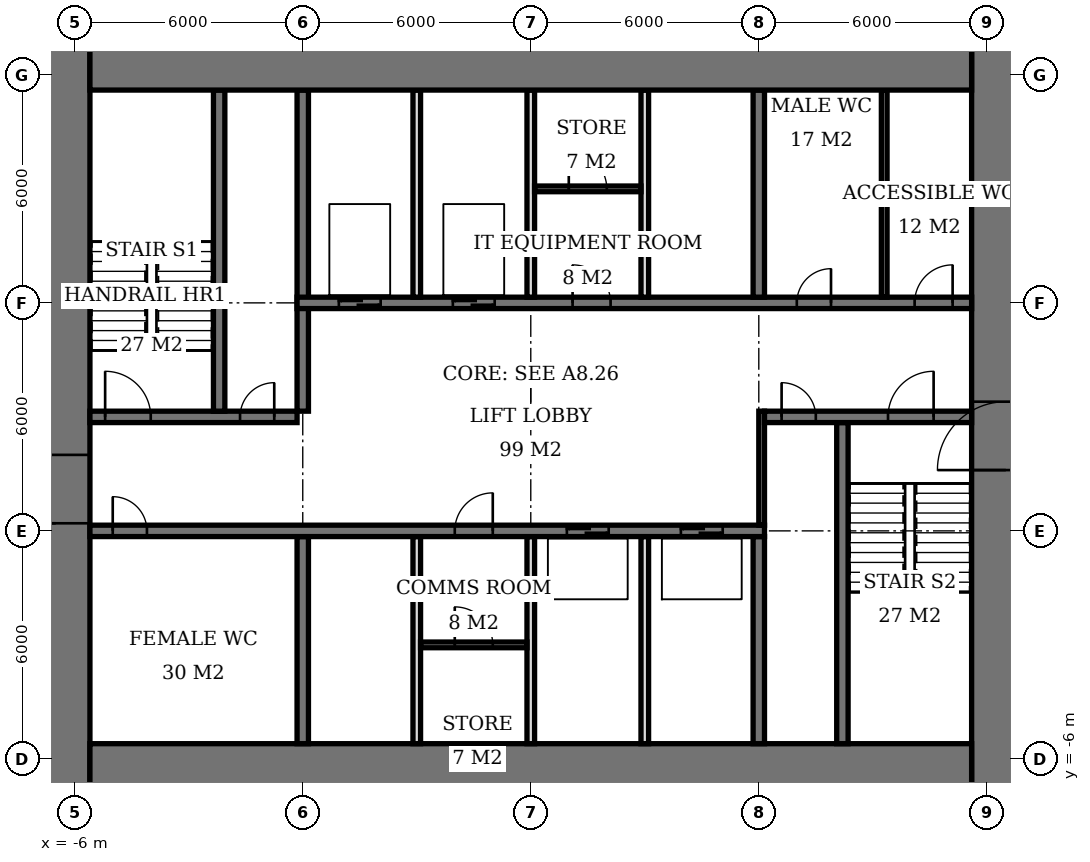
"""IFC4 building model, lengths in metres.
Left out: names, types, materials, properties, quantities, classifications, styles, units other than length and angle.
Written with IfcOpenShell. Run it as: python <this file> out.ifc"""

import sys

from ifc_helpers import new_model, si_unit, direction, frame, frame_2d, origin, place, context, subcontext, project, spatial, rectangle, extrude, element, fill, save


model = new_model("IFC4")
c1 = context("Model", 3, precision=1e-05, world=origin(), true_north=direction((0.0, 1.0)))
c2 = subcontext(c1, "Body", "Model", "MODEL_VIEW")
j1 = project(units=[si_unit("LENGTHUNIT", "METRE"), si_unit("PLANEANGLEUNIT", "RADIAN")], contexts=[c1])
p1 = place(None, origin())
s1 = spatial("IfcSite", under=j1, at=p1, CompositionType="ELEMENT")
p2 = place(p1, origin())
s2 = spatial("IfcBuilding", under=s1, at=p2, CompositionType="ELEMENT")
p3 = place(p2, frame((0.0, 0.0, 177.2)))
s3 = spatial("IfcBuildingStorey", under=s2, at=p3, CompositionType="ELEMENT", Elevation=177.2)
for number, where, z_axis, x_axis in (
    (1, (-5.6, -6.6, 0.0), (0.0, 0.0, 1.0), (1.0, 0.0, 0.0)),
    (2, (-5.6, 12.6, 0.0), (0.0, 0.0, 1.0), (1.0, 0.0, 0.0)),
):
    element("IfcWall", number, at=place(p3, frame(where, z_axis=z_axis, x_axis=x_axis)), inside=s3, PredefinedType="SHEAR", context=c2, shape_type="SweptSolid", body=[
        extrude(rectangle(XDim=23.2, YDim=2.0, at=frame_2d((11.6, 0.0))), origin(), (0.0, 0.0, 1.0), 3.9),
    ])
p4 = place(p3, frame((-6.5, -7.6, 0.0), z_axis=(0.0, 0.0, 1.0), x_axis=(0.0, 1.0, 0.0)))
e3 = element("IfcWall", 3, at=p4, inside=s3, PredefinedType="SHEAR", context=c2, shape_type="SweptSolid", body=[
    extrude(rectangle(XDim=21.2, YDim=1.8, at=frame_2d((10.6, 0.0))), origin(), (0.0, 0.0, 1.0), 3.9),
])
p5 = place(p4, frame((7.8, 0.0, 0.0)))
e4 = element("IfcOpeningElement", 4, at=p5, cuts=e3, PredefinedType="OPENING", context=c2, shape_type="SweptSolid", body=[
    extrude(rectangle(XDim=1.8, YDim=2.4, at=frame_2d((0.9, 1.2))), frame((0.0, 0.91, 0.0), z_axis=(0.0, -1.0, 0.0), x_axis=(1.0, 0.0, 0.0)), (0.0, 0.0, 1.0), 1.82),
])
p6 = place(p3, frame((18.5, -7.6, 0.0), z_axis=(0.0, 0.0, 1.0), x_axis=(0.0, 1.0, 0.0)))
e5 = element("IfcWall", 5, at=p6, inside=s3, PredefinedType="SHEAR", context=c2, shape_type="SweptSolid", body=[
    extrude(rectangle(XDim=21.2, YDim=1.8, at=frame_2d((10.6, 0.0))), origin(), (0.0, 0.0, 1.0), 3.9),
])
p7 = place(p6, frame((9.2, 0.0, 0.0)))
e6 = element("IfcOpeningElement", 6, at=p7, cuts=e5, PredefinedType="OPENING", context=c2, shape_type="SweptSolid", body=[
    extrude(rectangle(XDim=1.8, YDim=2.4, at=frame_2d((0.9, 1.2))), frame((0.0, 0.91, 0.0), z_axis=(0.0, -1.0, 0.0), x_axis=(1.0, 0.0, 0.0)), (0.0, 0.0, 1.0), 1.82),
])
p8 = place(p3, frame((-5.6, 0.0, 0.0), z_axis=(0.0, 0.0, 1.0), x_axis=(1.0, 0.0, 0.0)))
e7 = element("IfcWall", 7, at=p8, inside=s3, PredefinedType="SHEAR", context=c2, shape_type="SweptSolid", body=[
    extrude(rectangle(XDim=17.75, YDim=0.3, at=frame_2d((8.875, 0.0))), origin(), (0.0, 0.0, 1.0), 3.9),
])
p9 = place(p8, frame((0.6, 0.0, 0.0)))
e8 = element("IfcOpeningElement", 8, at=p9, cuts=e7, PredefinedType="OPENING", context=c2, shape_type="SweptSolid", body=[
    extrude(rectangle(XDim=0.9, YDim=2.1, at=frame_2d((0.45, 1.05))), frame((0.0, 0.16, 0.0), z_axis=(0.0, -1.0, 0.0), x_axis=(1.0, 0.0, 0.0)), (0.0, 0.0, 1.0), 0.32),
])
p10 = place(p8, frame((9.6, 0.0, 0.0)))
e9 = element("IfcOpeningElement", 9, at=p10, cuts=e7, PredefinedType="OPENING", context=c2, shape_type="SweptSolid", body=[
    extrude(rectangle(XDim=1.0, YDim=2.1, at=frame_2d((0.5, 1.05))), frame((0.0, 0.16, 0.0), z_axis=(0.0, -1.0, 0.0), x_axis=(1.0, 0.0, 0.0)), (0.0, 0.0, 1.0), 0.32),
])
p11 = place(p8, frame((12.55, 0.0, 0.0)))
e10 = element("IfcOpeningElement", 10, at=p11, cuts=e7, PredefinedType="OPENING", context=c2, shape_type="SweptSolid", body=[
    extrude(rectangle(XDim=1.1, YDim=2.1, at=frame_2d((0.55, 1.05))), frame((0.0, 0.16, 0.0), z_axis=(0.0, -1.0, 0.0), x_axis=(1.0, 0.0, 0.0)), (0.0, 0.0, 1.0), 0.32),
])
p12 = place(p8, frame((15.55, 0.0, 0.0)))
e11 = element("IfcOpeningElement", 11, at=p12, cuts=e7, PredefinedType="OPENING", context=c2, shape_type="SweptSolid", body=[
    extrude(rectangle(XDim=1.1, YDim=2.1, at=frame_2d((0.55, 1.05))), frame((0.0, 0.16, 0.0), z_axis=(0.0, -1.0, 0.0), x_axis=(1.0, 0.0, 0.0)), (0.0, 0.0, 1.0), 0.32),
])
p13 = place(p3, frame((-5.6, 3.0, 0.0), z_axis=(0.0, 0.0, 1.0), x_axis=(1.0, 0.0, 0.0)))
e12 = element("IfcWall", 12, at=p13, inside=s3, PredefinedType="SHEAR", context=c2, shape_type="SweptSolid", body=[
    extrude(rectangle(XDim=5.45, YDim=0.3, at=frame_2d((2.725, 0.0))), origin(), (0.0, 0.0, 1.0), 3.9),
])
p14 = place(p13, frame((0.4, 0.0, 0.0)))
e13 = element("IfcOpeningElement", 13, at=p14, cuts=e12, PredefinedType="OPENING", context=c2, shape_type="SweptSolid", body=[
    extrude(rectangle(XDim=1.2, YDim=2.1, at=frame_2d((0.6, 1.05))), frame((0.0, 0.16, 0.0), z_axis=(0.0, -1.0, 0.0), x_axis=(1.0, 0.0, 0.0)), (0.0, 0.0, 1.0), 0.32),
])
p15 = place(p13, frame((3.95, 0.0, 0.0)))
e14 = element("IfcOpeningElement", 14, at=p15, cuts=e12, PredefinedType="OPENING", context=c2, shape_type="SweptSolid", body=[
    extrude(rectangle(XDim=0.9, YDim=2.1, at=frame_2d((0.45, 1.05))), frame((0.0, 0.16, 0.0), z_axis=(0.0, -1.0, 0.0), x_axis=(1.0, 0.0, 0.0)), (0.0, 0.0, 1.0), 0.32),
])
p16 = place(p3, frame((12.15, 3.0, 0.0), z_axis=(0.0, 0.0, 1.0), x_axis=(1.0, 0.0, 0.0)))
e15 = element("IfcWall", 15, at=p16, inside=s3, PredefinedType="SHEAR", context=c2, shape_type="SweptSolid", body=[
    extrude(rectangle(XDim=5.45, YDim=0.3, at=frame_2d((2.725, 0.0))), origin(), (0.0, 0.0, 1.0), 3.9),
])
p17 = place(p16, frame((3.25, 0.0, 0.0)))
e16 = element("IfcOpeningElement", 16, at=p17, cuts=e15, PredefinedType="OPENING", context=c2, shape_type="SweptSolid", body=[
    extrude(rectangle(XDim=1.2, YDim=2.1, at=frame_2d((0.6, 1.05))), frame((0.0, 0.16, 0.0), z_axis=(0.0, -1.0, 0.0), x_axis=(1.0, 0.0, 0.0)), (0.0, 0.0, 1.0), 0.32),
])
p18 = place(p16, frame((0.45, 0.0, 0.0)))
e17 = element("IfcOpeningElement", 17, at=p18, cuts=e15, PredefinedType="OPENING", context=c2, shape_type="SweptSolid", body=[
    extrude(rectangle(XDim=0.9, YDim=2.1, at=frame_2d((0.45, 1.05))), frame((0.0, 0.16, 0.0), z_axis=(0.0, -1.0, 0.0), x_axis=(1.0, 0.0, 0.0)), (0.0, 0.0, 1.0), 0.32),
])
p19 = place(p3, frame((-0.15, 6.0, 0.0), z_axis=(0.0, 0.0, 1.0), x_axis=(1.0, 0.0, 0.0)))
e18 = element("IfcWall", 18, at=p19, inside=s3, PredefinedType="SHEAR", context=c2, shape_type="SweptSolid", body=[
    extrude(rectangle(XDim=17.75, YDim=0.3, at=frame_2d((8.875, 0.0))), origin(), (0.0, 0.0, 1.0), 3.9),
])
p20 = place(p19, frame((13.15, 0.0, 0.0)))
e19 = element("IfcOpeningElement", 19, at=p20, cuts=e18, PredefinedType="OPENING", context=c2, shape_type="SweptSolid", body=[
    extrude(rectangle(XDim=0.9, YDim=2.1, at=frame_2d((0.45, 1.05))), frame((0.0, 0.16, 0.0), z_axis=(0.0, -1.0, 0.0), x_axis=(1.0, 0.0, 0.0)), (0.0, 0.0, 1.0), 0.32),
])
p21 = place(p19, frame((16.25, 0.0, 0.0)))
e20 = element("IfcOpeningElement", 20, at=p21, cuts=e18, PredefinedType="OPENING", context=c2, shape_type="SweptSolid", body=[
    extrude(rectangle(XDim=1.0, YDim=2.1, at=frame_2d((0.5, 1.05))), frame((0.0, 0.16, 0.0), z_axis=(0.0, -1.0, 0.0), x_axis=(1.0, 0.0, 0.0)), (0.0, 0.0, 1.0), 0.32),
])
p22 = place(p19, frame((7.25, 0.0, 0.0)))
e21 = element("IfcOpeningElement", 21, at=p22, cuts=e18, PredefinedType="OPENING", context=c2, shape_type="SweptSolid", body=[
    extrude(rectangle(XDim=1.0, YDim=2.1, at=frame_2d((0.5, 1.05))), frame((0.0, 0.16, 0.0), z_axis=(0.0, -1.0, 0.0), x_axis=(1.0, 0.0, 0.0)), (0.0, 0.0, 1.0), 0.32),
])
p23 = place(p19, frame((1.1, 0.0, 0.0)))
e22 = element("IfcOpeningElement", 22, at=p23, cuts=e18, PredefinedType="OPENING", context=c2, shape_type="SweptSolid", body=[
    extrude(rectangle(XDim=1.1, YDim=2.1, at=frame_2d((0.55, 1.05))), frame((0.0, 0.16, 0.0), z_axis=(0.0, -1.0, 0.0), x_axis=(1.0, 0.0, 0.0)), (0.0, 0.0, 1.0), 0.32),
])
p24 = place(p19, frame((4.1, 0.0, 0.0)))
e23 = element("IfcOpeningElement", 23, at=p24, cuts=e18, PredefinedType="OPENING", context=c2, shape_type="SweptSolid", body=[
    extrude(rectangle(XDim=1.1, YDim=2.1, at=frame_2d((0.55, 1.05))), frame((0.0, 0.16, 0.0), z_axis=(0.0, -1.0, 0.0), x_axis=(1.0, 0.0, 0.0)), (0.0, 0.0, 1.0), 0.32),
])
p25 = place(p3, frame((0.0, -5.6, 0.0), z_axis=(0.0, 0.0, 1.0), x_axis=(0.0, 1.0, 0.0)))
e24 = element("IfcWall", 24, at=p25, inside=s3, PredefinedType="SHEAR", context=c2, shape_type="SweptSolid", body=[
    extrude(rectangle(XDim=5.45, YDim=0.3, at=frame_2d((2.725, 0.0))), origin(), (0.0, 0.0, 1.0), 3.9),
])
p26 = place(p3, frame((0.0, 3.15, 0.0), z_axis=(0.0, 0.0, 1.0), x_axis=(0.0, 1.0, 0.0)))
e25 = element("IfcWall", 25, at=p26, inside=s3, PredefinedType="SHEAR", context=c2, shape_type="SweptSolid", body=[
    extrude(rectangle(XDim=8.45, YDim=0.3, at=frame_2d((4.225, 0.0))), origin(), (0.0, 0.0, 1.0), 3.9),
])
for number, where, z_axis, x_axis in (
    (26, (12.0, -5.6, 0.0), (0.0, 0.0, 1.0), (0.0, 1.0, 0.0)),
    (27, (12.0, 6.15, 0.0), (0.0, 0.0, 1.0), (0.0, 1.0, 0.0)),
):
    element("IfcWall", number, at=place(p3, frame(where, z_axis=z_axis, x_axis=x_axis)), inside=s3, PredefinedType="SHEAR", context=c2, shape_type="SweptSolid", body=[
        extrude(rectangle(XDim=5.45, YDim=0.3, at=frame_2d((2.725, 0.0))), origin(), (0.0, 0.0, 1.0), 3.9),
    ])
for number, where, z_axis, x_axis in (
    (28, (-2.2, 3.15, 0.0), (0.0, 0.0, 1.0), (0.0, 1.0, 0.0)),
    (29, (14.2, -5.6, 0.0), (0.0, 0.0, 1.0), (0.0, 1.0, 0.0)),
):
    element("IfcWall", number, at=place(p3, frame(where, z_axis=z_axis, x_axis=x_axis)), inside=s3, PredefinedType="SHEAR", context=c2, shape_type="SweptSolid", body=[
        extrude(rectangle(XDim=8.45, YDim=0.3, at=frame_2d((4.225, 0.0))), origin(), (0.0, 0.0, 1.0), 3.9),
    ])
for number, where, z_axis, x_axis in (
    (30, (3.0, 6.15, 0.0), (0.0, 0.0, 1.0), (0.0, 1.0, 0.0)),
    (31, (6.0, 6.15, 0.0), (0.0, 0.0, 1.0), (0.0, 1.0, 0.0)),
    (32, (9.0, 6.15, 0.0), (0.0, 0.0, 1.0), (0.0, 1.0, 0.0)),
    (33, (3.0, -5.6, 0.0), (0.0, 0.0, 1.0), (0.0, 1.0, 0.0)),
    (34, (6.0, -5.6, 0.0), (0.0, 0.0, 1.0), (0.0, 1.0, 0.0)),
    (35, (9.0, -5.6, 0.0), (0.0, 0.0, 1.0), (0.0, 1.0, 0.0)),
):
    element("IfcWall", number, at=place(p3, frame(where, z_axis=z_axis, x_axis=x_axis)), inside=s3, PredefinedType="SOLIDWALL", context=c2, shape_type="SweptSolid", body=[
        extrude(rectangle(XDim=5.45, YDim=0.2, at=frame_2d((2.725, 0.0))), origin(), (0.0, 0.0, 1.0), 3.9),
    ])
p27 = place(p3, frame((15.3, 6.15, 0.0), z_axis=(0.0, 0.0, 1.0), x_axis=(0.0, 1.0, 0.0)))
e36 = element("IfcWall", 36, at=p27, inside=s3, PredefinedType="PLUMBINGWALL", context=c2, shape_type="SweptSolid", body=[
    extrude(rectangle(XDim=5.45, YDim=0.15, at=frame_2d((2.725, 0.0))), origin(), (0.0, 0.0, 1.0), 3.65),
])
p28 = place(p3, frame((6.1, 9.0, 0.0), z_axis=(0.0, 0.0, 1.0), x_axis=(1.0, 0.0, 0.0)))
e37 = element("IfcWall", 37, at=p28, inside=s3, PredefinedType="PARTITIONING", context=c2, shape_type="SweptSolid", body=[
    extrude(rectangle(XDim=2.8, YDim=0.15, at=frame_2d((1.4, 0.0))), origin(), (0.0, 0.0, 1.0), 3.65),
])
p29 = place(p28, frame((0.9, 0.0, 0.0)))
e38 = element("IfcOpeningElement", 38, at=p29, cuts=e37, PredefinedType="OPENING", context=c2, shape_type="SweptSolid", body=[
    extrude(rectangle(XDim=1.0, YDim=2.1, at=frame_2d((0.5, 1.05))), frame((0.0, 0.085, 0.0), z_axis=(0.0, -1.0, 0.0), x_axis=(1.0, 0.0, 0.0)), (0.0, 0.0, 1.0), 0.17),
])
p30 = place(p3, frame((3.1, -3.0, 0.0), z_axis=(0.0, 0.0, 1.0), x_axis=(1.0, 0.0, 0.0)))
e39 = element("IfcWall", 39, at=p30, inside=s3, PredefinedType="PARTITIONING", context=c2, shape_type="SweptSolid", body=[
    extrude(rectangle(XDim=2.8, YDim=0.15, at=frame_2d((1.4, 0.0))), origin(), (0.0, 0.0, 1.0), 3.65),
])
p31 = place(p30, frame((0.9, 0.0, 0.0)))
e40 = element("IfcOpeningElement", 40, at=p31, cuts=e39, PredefinedType="OPENING", context=c2, shape_type="SweptSolid", body=[
    extrude(rectangle(XDim=1.0, YDim=2.1, at=frame_2d((0.5, 1.05))), frame((0.0, 0.085, 0.0), z_axis=(0.0, -1.0, 0.0), x_axis=(1.0, 0.0, 0.0)), (0.0, 0.0, 1.0), 0.17),
])
p32 = place(p3, frame((12.075, 0.15, 0.0), z_axis=(0.0, 0.0, 1.0), x_axis=(0.0, 1.0, 0.0)))
e41 = element("IfcWall", 41, at=p32, inside=s3, PredefinedType="PARTITIONING", context=c2, shape_type="SweptSolid", body=[
    extrude(rectangle(XDim=3.0, YDim=0.15, at=frame_2d((1.5, 0.0))), origin(), (0.0, 0.0, 1.0), 3.65),
])
p33 = place(p5, origin())
e42 = element("IfcDoor", 42, at=p33, inside=s3, OperationType="DOUBLE_DOOR_SINGLE_SWING", PredefinedType="DOOR", context=c2, shape_type="SweptSolid", body=[
    extrude(rectangle(XDim=1.8, YDim=2.4, at=frame_2d((0.9, 1.2))), frame((0.0, 0.025, 0.0), z_axis=(0.0, -1.0, 0.0), x_axis=(1.0, 0.0, 0.0)), (0.0, 0.0, 1.0), 0.05),
])
fill(e4, e42)
p34 = place(p7, origin())
e43 = element("IfcDoor", 43, at=p34, inside=s3, OperationType="DOUBLE_DOOR_SINGLE_SWING", PredefinedType="DOOR", context=c2, shape_type="SweptSolid", body=[
    extrude(rectangle(XDim=1.8, YDim=2.4, at=frame_2d((0.9, 1.2))), frame((0.0, 0.025, 0.0), z_axis=(0.0, -1.0, 0.0), x_axis=(1.0, 0.0, 0.0)), (0.0, 0.0, 1.0), 0.05),
])
fill(e6, e43)
p35 = place(p14, origin())
e44 = element("IfcDoor", 44, at=p35, inside=s3, OperationType="SINGLE_SWING_LEFT", PredefinedType="DOOR", context=c2, shape_type="SweptSolid", body=[
    extrude(rectangle(XDim=1.2, YDim=2.1, at=frame_2d((0.6, 1.05))), frame((0.0, 0.025, 0.0), z_axis=(0.0, -1.0, 0.0), x_axis=(1.0, 0.0, 0.0)), (0.0, 0.0, 1.0), 0.05),
])
fill(e13, e44)
p36 = place(p15, origin())
e45 = element("IfcDoor", 45, at=p36, inside=s3, OperationType="SINGLE_SWING_RIGHT", PredefinedType="DOOR", context=c2, shape_type="SweptSolid", body=[
    extrude(rectangle(XDim=0.9, YDim=2.1, at=frame_2d((0.45, 1.05))), frame((0.0, 0.025, 0.0), z_axis=(0.0, -1.0, 0.0), x_axis=(1.0, 0.0, 0.0)), (0.0, 0.0, 1.0), 0.05),
])
fill(e14, e45)
p37 = place(p17, origin())
e46 = element("IfcDoor", 46, at=p37, inside=s3, OperationType="SINGLE_SWING_RIGHT", PredefinedType="DOOR", context=c2, shape_type="SweptSolid", body=[
    extrude(rectangle(XDim=1.2, YDim=2.1, at=frame_2d((0.6, 1.05))), frame((0.0, 0.025, 0.0), z_axis=(0.0, -1.0, 0.0), x_axis=(1.0, 0.0, 0.0)), (0.0, 0.0, 1.0), 0.05),
])
fill(e16, e46)
p38 = place(p18, origin())
e47 = element("IfcDoor", 47, at=p38, inside=s3, OperationType="SINGLE_SWING_LEFT", PredefinedType="DOOR", context=c2, shape_type="SweptSolid", body=[
    extrude(rectangle(XDim=0.9, YDim=2.1, at=frame_2d((0.45, 1.05))), frame((0.0, 0.025, 0.0), z_axis=(0.0, -1.0, 0.0), x_axis=(1.0, 0.0, 0.0)), (0.0, 0.0, 1.0), 0.05),
])
fill(e17, e47)
p39 = place(p9, origin())
e48 = element("IfcDoor", 48, at=p39, inside=s3, OperationType="SINGLE_SWING_LEFT", PredefinedType="DOOR", context=c2, shape_type="SweptSolid", body=[
    extrude(rectangle(XDim=0.9, YDim=2.1, at=frame_2d((0.45, 1.05))), frame((0.0, 0.025, 0.0), z_axis=(0.0, -1.0, 0.0), x_axis=(1.0, 0.0, 0.0)), (0.0, 0.0, 1.0), 0.05),
])
fill(e8, e48)
p40 = place(p20, origin())
e49 = element("IfcDoor", 49, at=p40, inside=s3, OperationType="SINGLE_SWING_RIGHT", PredefinedType="DOOR", context=c2, shape_type="SweptSolid", body=[
    extrude(rectangle(XDim=0.9, YDim=2.1, at=frame_2d((0.45, 1.05))), frame((0.0, 0.025, 0.0), z_axis=(0.0, -1.0, 0.0), x_axis=(1.0, 0.0, 0.0)), (0.0, 0.0, 1.0), 0.05),
])
fill(e19, e49)
p41 = place(p21, origin())
e50 = element("IfcDoor", 50, at=p41, inside=s3, OperationType="SINGLE_SWING_RIGHT", PredefinedType="DOOR", context=c2, shape_type="SweptSolid", body=[
    extrude(rectangle(XDim=1.0, YDim=2.1, at=frame_2d((0.5, 1.05))), frame((0.0, 0.025, 0.0), z_axis=(0.0, -1.0, 0.0), x_axis=(1.0, 0.0, 0.0)), (0.0, 0.0, 1.0), 0.05),
])
fill(e20, e50)
p42 = place(p29, origin())
e51 = element("IfcDoor", 51, at=p42, inside=s3, OperationType="SINGLE_SWING_LEFT", PredefinedType="DOOR", context=c2, shape_type="SweptSolid", body=[
    extrude(rectangle(XDim=1.0, YDim=2.1, at=frame_2d((0.5, 1.05))), frame((0.0, 0.025, 0.0), z_axis=(0.0, -1.0, 0.0), x_axis=(1.0, 0.0, 0.0)), (0.0, 0.0, 1.0), 0.05),
])
fill(e38, e51)
p43 = place(p22, origin())
e52 = element("IfcDoor", 52, at=p43, inside=s3, OperationType="SINGLE_SWING_LEFT", PredefinedType="DOOR", context=c2, shape_type="SweptSolid", body=[
    extrude(rectangle(XDim=1.0, YDim=2.1, at=frame_2d((0.5, 1.05))), frame((0.0, 0.025, 0.0), z_axis=(0.0, -1.0, 0.0), x_axis=(1.0, 0.0, 0.0)), (0.0, 0.0, 1.0), 0.05),
])
fill(e21, e52)
p44 = place(p31, origin())
e53 = element("IfcDoor", 53, at=p44, inside=s3, OperationType="SINGLE_SWING_LEFT", PredefinedType="DOOR", context=c2, shape_type="SweptSolid", body=[
    extrude(rectangle(XDim=1.0, YDim=2.1, at=frame_2d((0.5, 1.05))), frame((0.0, 0.025, 0.0), z_axis=(0.0, -1.0, 0.0), x_axis=(1.0, 0.0, 0.0)), (0.0, 0.0, 1.0), 0.05),
])
fill(e40, e53)
p45 = place(p10, origin())
e54 = element("IfcDoor", 54, at=p45, inside=s3, OperationType="SINGLE_SWING_RIGHT", PredefinedType="DOOR", context=c2, shape_type="SweptSolid", body=[
    extrude(rectangle(XDim=1.0, YDim=2.1, at=frame_2d((0.5, 1.05))), frame((0.0, 0.025, 0.0), z_axis=(0.0, -1.0, 0.0), x_axis=(1.0, 0.0, 0.0)), (0.0, 0.0, 1.0), 0.05),
])
fill(e9, e54)
p46 = place(p23, origin())
e55 = element("IfcDoor", 55, at=p46, inside=s3, OperationType="DOUBLE_DOOR_SLIDING", PredefinedType="USERDEFINED", context=c2, shape_type="SweptSolid", body=[
    extrude(rectangle(XDim=1.1, YDim=2.1, at=frame_2d((0.55, 1.05))), frame((0.0, 0.025, 0.0), z_axis=(0.0, -1.0, 0.0), x_axis=(1.0, 0.0, 0.0)), (0.0, 0.0, 1.0), 0.05),
])
fill(e22, e55)
p47 = place(p24, origin())
e56 = element("IfcDoor", 56, at=p47, inside=s3, OperationType="DOUBLE_DOOR_SLIDING", PredefinedType="USERDEFINED", context=c2, shape_type="SweptSolid", body=[
    extrude(rectangle(XDim=1.1, YDim=2.1, at=frame_2d((0.55, 1.05))), frame((0.0, 0.025, 0.0), z_axis=(0.0, -1.0, 0.0), x_axis=(1.0, 0.0, 0.0)), (0.0, 0.0, 1.0), 0.05),
])
fill(e23, e56)
p48 = place(p11, origin())
e57 = element("IfcDoor", 57, at=p48, inside=s3, OperationType="DOUBLE_DOOR_SLIDING", PredefinedType="USERDEFINED", context=c2, shape_type="SweptSolid", body=[
    extrude(rectangle(XDim=1.1, YDim=2.1, at=frame_2d((0.55, 1.05))), frame((0.0, 0.025, 0.0), z_axis=(0.0, -1.0, 0.0), x_axis=(1.0, 0.0, 0.0)), (0.0, 0.0, 1.0), 0.05),
])
fill(e10, e57)
p49 = place(p12, origin())
e58 = element("IfcDoor", 58, at=p49, inside=s3, OperationType="DOUBLE_DOOR_SLIDING", PredefinedType="USERDEFINED", context=c2, shape_type="SweptSolid", body=[
    extrude(rectangle(XDim=1.1, YDim=2.1, at=frame_2d((0.55, 1.05))), frame((0.0, 0.025, 0.0), z_axis=(0.0, -1.0, 0.0), x_axis=(1.0, 0.0, 0.0)), (0.0, 0.0, 1.0), 0.05),
])
fill(e11, e58)
save(model, sys.argv[1])
